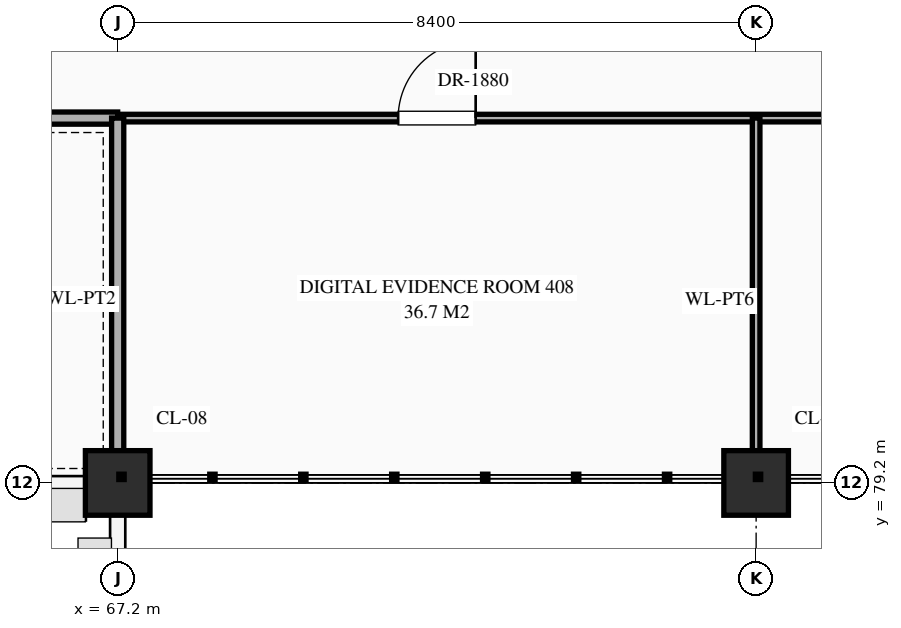
"""IFC4 building model, lengths in metres.
Left out: names, types, materials, properties, quantities, classifications, styles, units other than length and angle.
Written with IfcOpenShell. Run it as: python <this file> out.ifc"""

import sys

from ifc_helpers import new_model, si_unit, direction, frame, frame_2d, origin, origin_2d, place, context, subcontext, project, spatial, rectangle, circle, extrude, element, fill, save


model = new_model("IFC4")
c1 = context("Model", 3, precision=1e-05, world=origin(), true_north=direction((0.0, 1.0)))
c2 = subcontext(c1, "Body", "Model", "MODEL_VIEW")
j1 = project(units=[si_unit("LENGTHUNIT", "METRE"), si_unit("PLANEANGLEUNIT", "RADIAN")], contexts=[c1])
p1 = place(None, origin())
s1 = spatial("IfcSite", under=j1, at=p1, CompositionType="ELEMENT")
p2 = place(p1, origin())
s2 = spatial("IfcBuilding", under=s1, at=p2, CompositionType="ELEMENT")
p3 = place(p2, frame((0.0, 0.0, 16.2)))
s3 = spatial("IfcBuildingStorey", under=s2, at=p3, CompositionType="ELEMENT", Elevation=16.2)
for number, where, z_axis, x_axis in (
    (1, (67.2, 79.2, 0.0), (0.0, 0.0, 1.0), (1.0, 0.0, 0.0)),
    (2, (75.6, 79.2, 0.0), (0.0, 0.0, 1.0), (1.0, 0.0, 0.0)),
):
    element("IfcColumn", number, at=place(p3, frame(where, z_axis=z_axis, x_axis=x_axis)), inside=s3, PredefinedType="COLUMN", context=c2, shape_type="SweptSolid", body=[
        extrude(circle(Radius=0.425, at=origin_2d()), origin(), (0.0, 0.0, 1.0), 5.4),
    ])
p4 = place(p3, frame((50.4, 84.0, 0.0), z_axis=(0.0, 0.0, 1.0), x_axis=(1.0, 0.0, 0.0)))
e3 = element("IfcWall", 3, at=p4, inside=s3, PredefinedType="STANDARD", context=c2, shape_type="SweptSolid", body=[
    extrude(rectangle(XDim=16.8, YDim=0.16, at=frame_2d((8.4, 0.0))), origin(), (0.0, 0.0, 1.0), 5.12),
])
p5 = place(p4, frame((7.45, 0.0, 0.0)))
e4 = element("IfcOpeningElement", 4, at=p5, cuts=e3, PredefinedType="OPENING", context=c2, shape_type="SweptSolid", body=[
    extrude(rectangle(XDim=1.9, YDim=2.5, at=frame_2d((0.95, 1.25))), frame((0.0, 0.092, 0.0), z_axis=(0.0, -1.0, 0.0), x_axis=(1.0, 0.0, 0.0)), (0.0, 0.0, 1.0), 0.184),
])
p6 = place(p3, frame((67.2, 84.0, 0.0), z_axis=(0.0, 0.0, 1.0), x_axis=(1.0, 0.0, 0.0)))
e5 = element("IfcWall", 5, at=p6, inside=s3, PredefinedType="STANDARD", context=c2, shape_type="SweptSolid", body=[
    extrude(rectangle(XDim=33.6, YDim=0.1, at=frame_2d((16.8, 0.0))), origin(), (0.0, 0.0, 1.0), 5.12),
])
p7 = place(p6, frame((3.69, 0.0, 0.0)))
e6 = element("IfcOpeningElement", 6, at=p7, cuts=e5, PredefinedType="OPENING", context=c2, shape_type="SweptSolid", body=[
    extrude(rectangle(XDim=1.02, YDim=2.4, at=frame_2d((0.51, 1.2))), frame((0.0, 0.062, 0.0), z_axis=(0.0, -1.0, 0.0), x_axis=(1.0, 0.0, 0.0)), (0.0, 0.0, 1.0), 0.124),
])
p8 = place(p6, frame((12.07, 0.0, 0.0)))
e7 = element("IfcOpeningElement", 7, at=p8, cuts=e5, PredefinedType="OPENING", context=c2, shape_type="SweptSolid", body=[
    extrude(rectangle(XDim=1.06, YDim=2.4, at=frame_2d((0.53, 1.2))), frame((0.0, 0.062, 0.0), z_axis=(0.0, -1.0, 0.0), x_axis=(1.0, 0.0, 0.0)), (0.0, 0.0, 1.0), 0.124),
])
p9 = place(p6, frame((20.55, 0.0, 0.0)))
e8 = element("IfcOpeningElement", 8, at=p9, cuts=e5, PredefinedType="OPENING", context=c2, shape_type="SweptSolid", body=[
    extrude(rectangle(XDim=0.9, YDim=2.15, at=frame_2d((0.45, 1.075))), frame((0.0, 0.062, 0.0), z_axis=(0.0, -1.0, 0.0), x_axis=(1.0, 0.0, 0.0)), (0.0, 0.0, 1.0), 0.124),
])
p10 = place(p6, frame((28.97, 0.0, 0.0)))
e9 = element("IfcOpeningElement", 9, at=p10, cuts=e5, PredefinedType="OPENING", context=c2, shape_type="SweptSolid", body=[
    extrude(rectangle(XDim=0.86, YDim=2.1, at=frame_2d((0.43, 1.05))), frame((0.0, 0.062, 0.0), z_axis=(0.0, -1.0, 0.0), x_axis=(1.0, 0.0, 0.0)), (0.0, 0.0, 1.0), 0.124),
])
p11 = place(p3, frame((67.2, 79.24, 0.0), z_axis=(0.0, 0.0, 1.0), x_axis=(0.0, 1.0, 0.0)))
e10 = element("IfcWall", 10, at=p11, inside=s3, PredefinedType="STANDARD", context=c2, shape_type="SweptSolid", body=[
    extrude(rectangle(XDim=4.76, YDim=0.16, at=frame_2d((2.38, 0.0))), origin(), (0.0, 0.0, 1.0), 4.37),
])
p12 = place(p3, frame((75.6, 79.2, 0.0), z_axis=(0.0, 0.0, 1.0), x_axis=(0.0, 1.0, 0.0)))
e11 = element("IfcWall", 11, at=p12, inside=s3, PredefinedType="STANDARD", context=c2, shape_type="SweptSolid", body=[
    extrude(rectangle(XDim=4.8, YDim=0.1, at=frame_2d((2.4, 0.0))), origin(), (0.0, 0.0, 1.0), 4.37),
])
p13 = place(p7, origin())
e12 = element("IfcDoor", 12, at=p13, inside=s3, OperationType="SINGLE_SWING_RIGHT", PredefinedType="DOOR", context=c2, shape_type="SweptSolid", body=[
    extrude(rectangle(XDim=1.02, YDim=2.4, at=frame_2d((0.51, 1.2))), frame((0.0, 0.025, 0.0), z_axis=(0.0, -1.0, 0.0), x_axis=(1.0, 0.0, 0.0)), (0.0, 0.0, 1.0), 0.05),
])
fill(e6, e12)
save(model, sys.argv[1])
